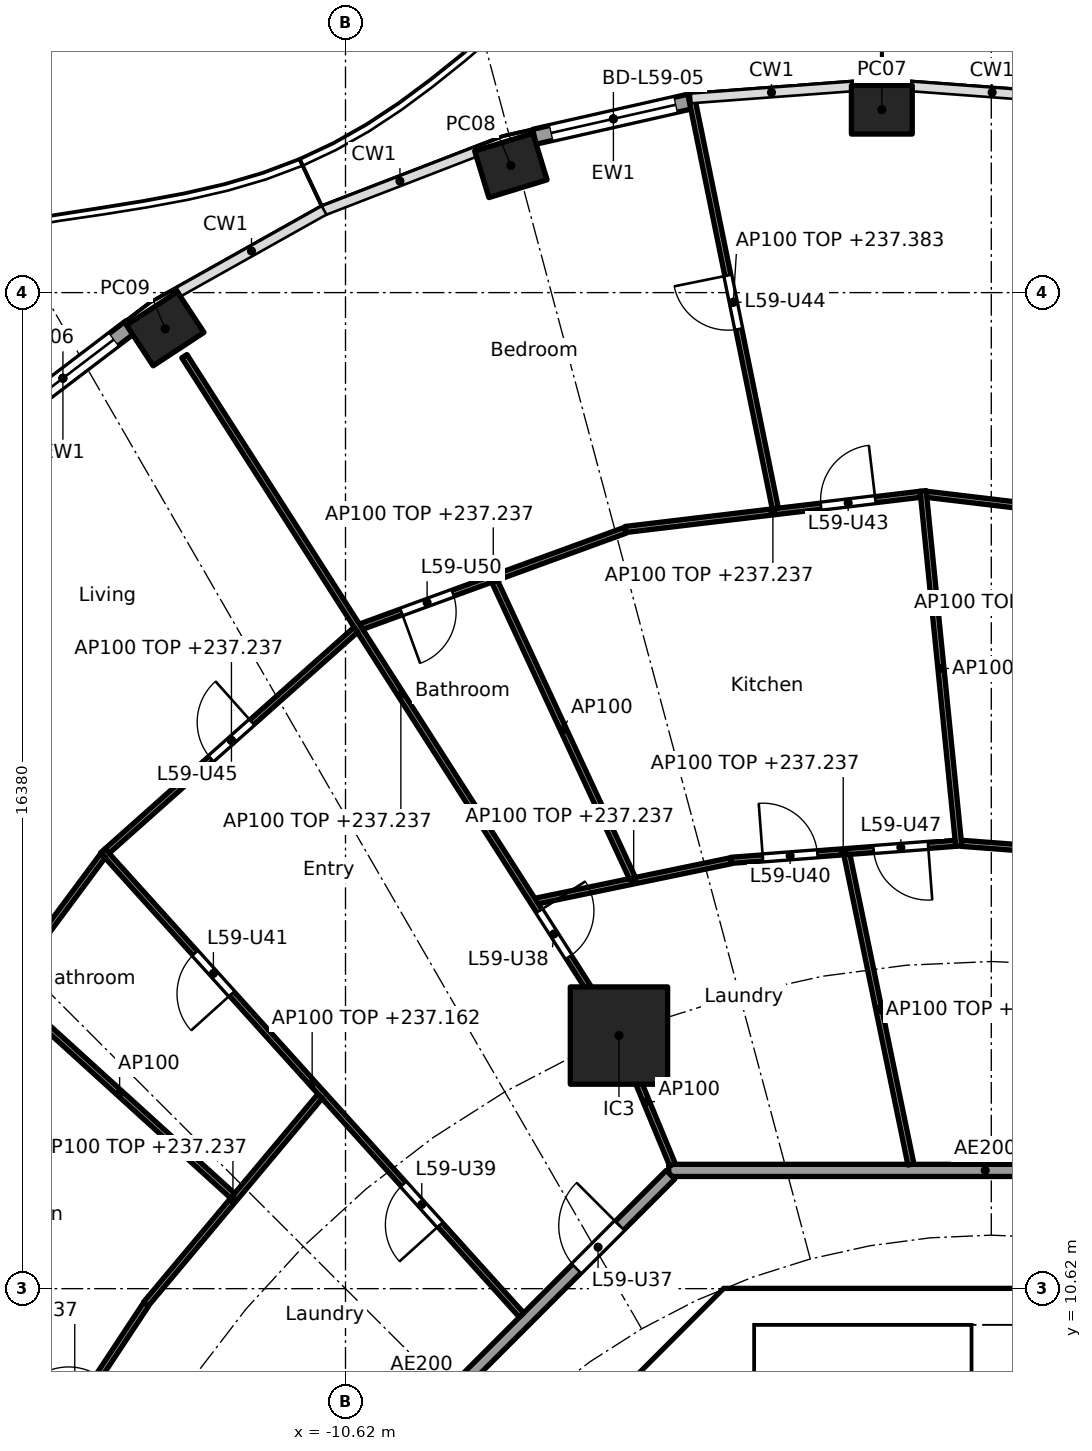
"""IFC4 building model, lengths in metres.
Left out: names, types, materials, properties, quantities, classifications, styles, units other than length and angle.
Written with IfcOpenShell. Run it as: python <this file> out.ifc"""

import sys

from ifc_helpers import new_model, si_unit, direction, frame, frame_2d, origin, origin_2d, place, context, subcontext, project, spatial, polyline, rectangle, hollow_rectangle, outline, extrude, element, fill, save


model = new_model("IFC4")
c1 = context("Model", 3, precision=1e-05, world=origin(), true_north=direction((0.0, 1.0)))
c2 = subcontext(c1, "Body", "Model", "MODEL_VIEW")
j1 = project(units=[si_unit("LENGTHUNIT", "METRE"), si_unit("PLANEANGLEUNIT", "RADIAN")], contexts=[c1])
p1 = place(None, origin())
s1 = spatial("IfcSite", under=j1, at=p1, CompositionType="ELEMENT")
p2 = place(p1, origin())
s2 = spatial("IfcBuilding", under=s1, at=p2, CompositionType="ELEMENT")
p3 = place(p2, frame((0.0, 0.0, 234.4)))
s3 = spatial("IfcBuildingStorey", under=s2, at=p3, CompositionType="ELEMENT", Elevation=234.4)
for number, where, z_axis, x_axis in (
    (1, (-1.8, 30.008, 0.0), (0.0, 0.0, 1.0), (-1.0, 0.0, 0.0)),
    (2, (-7.9, 29.092, 0.0), (0.0, 0.0, 1.0), (-0.957, -0.292, 0.0)),
    (3, (-13.585, 26.405, 0.0), (0.0, 0.0, 1.0), (-0.836, -0.549, 0.0)),
):
    element("IfcColumn", number, at=place(p3, frame(where, z_axis=z_axis, x_axis=x_axis)), inside=s3, PredefinedType="COLUMN", context=c2, shape_type="SweptSolid", body=[
        extrude(hollow_rectangle(XDim=1.0, YDim=0.8, WallThickness=0.032, at=origin_2d()), origin(), (0.0, 0.0, 1.0), 3.7),
    ])
p4 = place(p3, frame((-6.123, 14.782, 0.0), z_axis=(0.0, 0.0, 1.0), x_axis=(1.0, 0.0, 0.0)))
e4 = element("IfcColumn", 4, at=p4, inside=s3, PredefinedType="COLUMN", context=c2, shape_type="SweptSolid", body=[
    extrude(rectangle(XDim=1.6, YDim=1.6, at=origin_2d()), origin(), (0.0, 0.0, 1.0), 3.7),
])
p5 = place(p3, frame((-7.514, 29.563, 0.0), z_axis=(0.0, 0.0, 1.0), x_axis=(0.975324089124, 0.220777990694, 0.0)))
e5 = element("IfcWall", 5, at=p5, inside=s3, PredefinedType="SOLIDWALL", context=c2, shape_type="SweptSolid", body=[
    extrude(rectangle(XDim=2.666, YDim=0.25, at=frame_2d((1.333, 0.0))), origin(), (0.0, 0.0, 1.0), 3.44),
])
p6 = place(p5, frame((0.283, 0.0, 0.0)))
e6 = element("IfcOpeningElement", 6, at=p6, cuts=e5, PredefinedType="OPENING", context=c2, shape_type="SweptSolid", body=[
    extrude(rectangle(XDim=2.1, YDim=2.4, at=frame_2d((1.05, 1.2))), frame((0.0, 0.135, 0.0), z_axis=(0.0, -1.0, 0.0), x_axis=(1.0, 0.0, 0.0)), (0.0, 0.0, 1.0), 0.27),
])
p7 = place(p3, frame((-16.377, 24.748, 0.0), z_axis=(0.0, 0.0, 1.0), x_axis=(0.795990084031, 0.60530966135, 0.0)))
e7 = element("IfcWall", 7, at=p7, inside=s3, PredefinedType="SOLIDWALL", context=c2, shape_type="SweptSolid", body=[
    extrude(rectangle(XDim=2.789, YDim=0.25, at=frame_2d((1.394, 0.0))), origin(), (0.0, 0.0, 1.0), 3.44),
])
p8 = place(p7, frame((0.344, 0.0, 0.0)))
e8 = element("IfcOpeningElement", 8, at=p8, cuts=e7, PredefinedType="OPENING", context=c2, shape_type="SweptSolid", body=[
    extrude(rectangle(XDim=2.1, YDim=2.4, at=frame_2d((1.05, 1.2))), frame((0.0, 0.135, 0.0), z_axis=(0.0, -1.0, 0.0), x_axis=(1.0, 0.0, 0.0)), (0.0, 0.0, 1.0), 0.27),
])
p9 = place(p3, frame((-4.613, 9.988, 0.0), z_axis=(0.0, 0.0, 1.0), x_axis=(-0.707106781187, -0.707106781187, 0.0)))
e9 = element("IfcWall", 9, at=p9, inside=s3, PredefinedType="SHEAR", context=c2, shape_type="SweptSolid", body=[
    extrude(rectangle(XDim=7.602, YDim=0.6, at=frame_2d((3.801, 0.0))), origin(), (0.0, 0.0, 1.0), 3.44),
])
p10 = place(p9, frame((0.351, 0.0, 0.0)))
e10 = element("IfcOpeningElement", 10, at=p10, cuts=e9, PredefinedType="OPENING", context=c2, shape_type="SweptSolid", body=[
    extrude(rectangle(XDim=1.1, YDim=2.1, at=frame_2d((0.55, 1.05))), frame((0.0, 0.31, 0.0), z_axis=(0.0, -1.0, 0.0), x_axis=(1.0, 0.0, 0.0)), (0.0, 0.0, 1.0), 0.62),
])
p11 = place(p3, origin())
e11 = element("IfcWall", 11, at=p11, inside=s3, PredefinedType="SHEAR", context=c2, shape_type="SweptSolid", body=[
    extrude(outline(polyline([(-4.152, 10.025), (-4.401, 9.776), (-4.825, 10.2), (-4.401, 10.625), (4.401, 10.625), (4.825, 10.2), (4.401, 9.776), (4.152, 10.025), (-4.152, 10.025)])), origin(), (0.0, 0.0, 1.0), 3.44),
])
p12 = place(p3, origin())
e12 = element("IfcWall", 12, at=p12, inside=s3, PredefinedType="SOLIDWALL", context=c2, shape_type="SweptSolid", body=[
    extrude(outline(polyline([(-3.9, 7.025), (-4.1, 7.025), (-4.1, 10.025), (-3.9, 10.025), (-3.9, 7.025)])), origin(), (0.0, 0.0, 1.0), 3.44),
])
p13 = place(p3, frame((-14.829, 6.141, 0.0), z_axis=(0.0, 0.0, 1.0), x_axis=(-0.929202069098, 0.36957206981, 0.0)))
e13 = element("IfcWall", 13, at=p13, inside=s3, PredefinedType="PARTITIONING", context=c2, shape_type="SweptSolid", body=[
    extrude(rectangle(XDim=9.957, YDim=0.2, at=frame_2d((4.978, 0.0))), origin(), (0.0, 0.0, 1.0), 2.837),
])
p14 = place(p3, frame((5.104, 12.565, 0.0), z_axis=(0.0, 0.0, 1.0), x_axis=(-1.0, 0.0, 0.0)))
e14 = element("IfcWall", 14, at=p14, inside=s3, PredefinedType="PARTITIONING", context=c2, shape_type="SweptSolid", body=[
    extrude(rectangle(XDim=10.409, YDim=0.2, at=frame_2d((5.205, 0.0))), origin(), (0.0, 0.0, 1.0), 3.44),
])
p15 = place(p3, frame((-5.275, 12.494, 0.0), z_axis=(0.0, 0.0, 1.0), x_axis=(-0.707106781187, -0.707106781187, 0.0)))
e15 = element("IfcWall", 15, at=p15, inside=s3, PredefinedType="PARTITIONING", context=c2, shape_type="SweptSolid", body=[
    extrude(rectangle(XDim=10.209, YDim=0.2, at=frame_2d((5.104, 0.0))), origin(), (0.0, 0.0, 1.0), 3.44),
])
p16 = place(p15, frame((1.185, 0.0, 0.0)))
e16 = element("IfcOpeningElement", 16, at=p16, cuts=e15, PredefinedType="OPENING", context=c2, shape_type="SweptSolid", body=[
    extrude(rectangle(XDim=1.0, YDim=2.1, at=frame_2d((0.5, 1.05))), frame((0.0, 0.11, 0.0), z_axis=(0.0, -1.0, 0.0), x_axis=(1.0, 0.0, 0.0)), (0.0, 0.0, 1.0), 0.22),
])
p17 = place(p3, frame((3.101, 17.671, 0.0), z_axis=(0.0, 0.0, 1.0), x_axis=(-0.997133705575, 0.075659587668, 0.0)))
e17 = element("IfcWall", 17, at=p17, inside=s3, PredefinedType="PARTITIONING", context=c2, shape_type="SweptSolid", body=[
    extrude(rectangle(XDim=3.601, YDim=0.1, at=frame_2d((1.801, 0.0))), origin(), (0.0, 0.0, 1.0), 2.837),
])
p18 = place(p3, frame((3.686, 23.117, 0.0), z_axis=(0.0, 0.0, 1.0), x_axis=(-0.992965872314, 0.11840091393, 0.0)))
e18 = element("IfcWall", 18, at=p18, inside=s3, PredefinedType="PARTITIONING", context=c2, shape_type="SweptSolid", body=[
    extrude(rectangle(XDim=4.786, YDim=0.1, at=frame_2d((2.393, 0.0))), origin(), (0.0, 0.0, 1.0), 2.837),
])
p19 = place(p18, frame((1.943, 0.0, 0.0)))
e19 = element("IfcOpeningElement", 19, at=p19, cuts=e18, PredefinedType="OPENING", context=c2, shape_type="SweptSolid", body=[
    extrude(rectangle(XDim=0.9, YDim=2.1, at=frame_2d((0.45, 1.05))), frame((0.0, 0.06, 0.0), z_axis=(0.0, -1.0, 0.0), x_axis=(1.0, 0.0, 0.0)), (0.0, 0.0, 1.0), 0.12),
])
p20 = place(p3, frame((-0.535, 17.898, 0.0), z_axis=(0.0, 0.0, 1.0), x_axis=(-0.099853714131, 0.995002128527, 0.0)))
e20 = element("IfcWall", 20, at=p20, inside=s3, PredefinedType="PARTITIONING", context=c2, shape_type="SweptSolid", body=[
    extrude(rectangle(XDim=5.87, YDim=0.1, at=frame_2d((2.935, 0.0))), origin(), (0.0, 0.0, 1.0), 3.44),
])
p21 = place(p3, frame((-0.59, 17.944, 0.0), z_axis=(0.0, 0.0, 1.0), x_axis=(-0.997133495787, -0.075662352452, 0.0)))
e21 = element("IfcWall", 21, at=p21, inside=s3, PredefinedType="PARTITIONING", context=c2, shape_type="SweptSolid", body=[
    extrude(rectangle(XDim=3.701, YDim=0.1, at=frame_2d((1.851, 0.0))), origin(), (0.0, 0.0, 1.0), 2.837),
])
p22 = place(p21, frame((2.276, 0.0, 0.0)))
e22 = element("IfcOpeningElement", 22, at=p22, cuts=e21, PredefinedType="OPENING", context=c2, shape_type="SweptSolid", body=[
    extrude(rectangle(XDim=0.9, YDim=2.1, at=frame_2d((0.45, 1.05))), frame((0.0, 0.06, 0.0), z_axis=(0.0, -1.0, 0.0), x_axis=(1.0, 0.0, 0.0)), (0.0, 0.0, 1.0), 0.12),
])
p23 = place(p21, frame((0.45, 0.0, 0.0)))
e23 = element("IfcOpeningElement", 23, at=p23, cuts=e21, PredefinedType="OPENING", context=c2, shape_type="SweptSolid", body=[
    extrude(rectangle(XDim=0.9, YDim=2.1, at=frame_2d((0.45, 1.05))), frame((0.0, 0.06, 0.0), z_axis=(0.0, -1.0, 0.0), x_axis=(1.0, 0.0, 0.0)), (0.0, 0.0, 1.0), 0.12),
])
p24 = place(p3, frame((-1.166, 23.683, 0.0), z_axis=(0.0, 0.0, 1.0), x_axis=(-0.992961712415, -0.118435795593, 0.0)))
e24 = element("IfcWall", 24, at=p24, inside=s3, PredefinedType="PARTITIONING", context=c2, shape_type="SweptSolid", body=[
    extrude(rectangle(XDim=4.885, YDim=0.1, at=frame_2d((2.443, 0.0))), origin(), (0.0, 0.0, 1.0), 2.837),
])
p25 = place(p24, frame((0.746, 0.0, 0.0)))
e25 = element("IfcOpeningElement", 25, at=p25, cuts=e24, PredefinedType="OPENING", context=c2, shape_type="SweptSolid", body=[
    extrude(rectangle(XDim=0.9, YDim=2.1, at=frame_2d((0.45, 1.05))), frame((0.0, 0.06, 0.0), z_axis=(0.0, -1.0, 0.0), x_axis=(1.0, 0.0, 0.0)), (0.0, 0.0, 1.0), 0.12),
])
p26 = place(p3, frame((-1.321, 12.663, 0.0), z_axis=(0.0, 0.0, 1.0), x_axis=(-0.202526486639, 0.979276785291, 0.0)))
e26 = element("IfcWall", 26, at=p26, inside=s3, PredefinedType="PARTITIONING", context=c2, shape_type="SweptSolid", body=[
    extrude(rectangle(XDim=5.204, YDim=0.1, at=frame_2d((2.602, 0.0))), origin(), (0.0, 0.0, 1.0), 2.762),
])
p27 = place(p3, frame((-3.552, 23.449, 0.0), z_axis=(0.0, 0.0, 1.0), x_axis=(-0.199593197846, 0.979878847294, 0.0)))
e27 = element("IfcWall", 27, at=p27, inside=s3, PredefinedType="PARTITIONING", context=c2, shape_type="SweptSolid", body=[
    extrude(rectangle(XDim=6.925, YDim=0.1, at=frame_2d((3.462, 0.0))), origin(), (0.0, 0.0, 1.0), 2.983),
])
p28 = place(p27, frame((3.012, 0.0, 0.0)))
e28 = element("IfcOpeningElement", 28, at=p28, cuts=e27, PredefinedType="OPENING", context=c2, shape_type="SweptSolid", body=[
    extrude(rectangle(XDim=0.9, YDim=2.1, at=frame_2d((0.45, 1.05))), frame((0.0, 0.06, 0.0), z_axis=(0.0, -1.0, 0.0), x_axis=(1.0, 0.0, 0.0)), (0.0, 0.0, 1.0), 0.12),
])
p29 = place(p3, frame((-4.28, 17.657, 0.0), z_axis=(0.0, 0.0, 1.0), x_axis=(-0.979205232861, -0.202872156637, 0.0)))
e29 = element("IfcWall", 29, at=p29, inside=s3, PredefinedType="PARTITIONING", context=c2, shape_type="SweptSolid", body=[
    extrude(rectangle(XDim=3.271, YDim=0.1, at=frame_2d((1.635, 0.0))), origin(), (0.0, 0.0, 1.0), 2.837),
])
p30 = place(p3, frame((-6.014, 23.094, 0.0), z_axis=(0.0, 0.0, 1.0), x_axis=(-0.939417400947, -0.342775359089, 0.0)))
e30 = element("IfcWall", 30, at=p30, inside=s3, PredefinedType="PARTITIONING", context=c2, shape_type="SweptSolid", body=[
    extrude(rectangle(XDim=4.633, YDim=0.1, at=frame_2d((2.316, 0.0))), origin(), (0.0, 0.0, 1.0), 2.837),
])
p31 = place(p30, frame((3.024, 0.0, 0.0)))
e31 = element("IfcOpeningElement", 31, at=p31, cuts=e30, PredefinedType="OPENING", context=c2, shape_type="SweptSolid", body=[
    extrude(rectangle(XDim=0.9, YDim=2.1, at=frame_2d((0.45, 1.05))), frame((0.0, 0.06, 0.0), z_axis=(0.0, -1.0, 0.0), x_axis=(1.0, 0.0, 0.0)), (0.0, 0.0, 1.0), 0.12),
])
p32 = place(p3, frame((-5.902, 17.371, 0.0), z_axis=(0.0, 0.0, 1.0), x_axis=(-0.421124629357, 0.907002781996, 0.0)))
e32 = element("IfcWall", 32, at=p32, inside=s3, PredefinedType="PARTITIONING", context=c2, shape_type="SweptSolid", body=[
    extrude(rectangle(XDim=5.384, YDim=0.1, at=frame_2d((2.692, 0.0))), origin(), (0.0, 0.0, 1.0), 3.44),
])
p33 = place(p3, frame((-5.243, 12.657, 0.0), z_axis=(0.0, 0.0, 1.0), x_axis=(-0.382757529444, 0.923848837015, 0.0)))
e33 = element("IfcWall", 33, at=p33, inside=s3, PredefinedType="PARTITIONING", context=c2, shape_type="SweptSolid", body=[
    extrude(rectangle(XDim=2.25, YDim=0.1, at=frame_2d((1.125, 0.0))), origin(), (0.0, 0.0, 1.0), 3.44),
])
p34 = place(p3, frame((-6.15, 14.824, 0.0), z_axis=(0.0, 0.0, 1.0), x_axis=(-0.538870687577, 0.842388498301, 0.0)))
e34 = element("IfcWall", 34, at=p34, inside=s3, PredefinedType="PARTITIONING", context=c2, shape_type="SweptSolid", body=[
    extrude(rectangle(XDim=13.213, YDim=0.1, at=frame_2d((6.606, 0.0))), origin(), (0.0, 0.0, 1.0), 2.837),
])
p35 = place(p34, frame((1.483, 0.0, 0.0)))
e35 = element("IfcOpeningElement", 35, at=p35, cuts=e34, PredefinedType="OPENING", context=c2, shape_type="SweptSolid", body=[
    extrude(rectangle(XDim=0.9, YDim=2.1, at=frame_2d((0.45, 1.05))), frame((0.0, 0.06, 0.0), z_axis=(0.0, -1.0, 0.0), x_axis=(1.0, 0.0, 0.0)), (0.0, 0.0, 1.0), 0.12),
])
p36 = place(p3, frame((-10.45, 21.455, 0.0), z_axis=(0.0, 0.0, 1.0), x_axis=(-0.747150931973, -0.66465441009, 0.0)))
e36 = element("IfcWall", 36, at=p36, inside=s3, PredefinedType="PARTITIONING", context=c2, shape_type="SweptSolid", body=[
    extrude(rectangle(XDim=5.475, YDim=0.1, at=frame_2d((2.737, 0.0))), origin(), (0.0, 0.0, 1.0), 2.837),
])
p37 = place(p36, frame((2.288, 0.0, 0.0)))
e37 = element("IfcOpeningElement", 37, at=p37, cuts=e36, PredefinedType="OPENING", context=c2, shape_type="SweptSolid", body=[
    extrude(rectangle(XDim=0.9, YDim=2.1, at=frame_2d((0.45, 1.05))), frame((0.0, 0.06, 0.0), z_axis=(0.0, -1.0, 0.0), x_axis=(1.0, 0.0, 0.0)), (0.0, 0.0, 1.0), 0.12),
])
p38 = place(p3, frame((-7.725, 10.186, 0.0), z_axis=(0.0, 0.0, 1.0), x_axis=(-0.669819599194, 0.742523874725, 0.0)))
e38 = element("IfcWall", 38, at=p38, inside=s3, PredefinedType="PARTITIONING", context=c2, shape_type="SweptSolid", body=[
    extrude(rectangle(XDim=10.282, YDim=0.1, at=frame_2d((5.141, 0.0))), origin(), (0.0, 0.0, 1.0), 2.762),
])
p39 = place(p38, frame((2.0, 0.0, 0.0)))
e39 = element("IfcOpeningElement", 39, at=p39, cuts=e38, PredefinedType="OPENING", context=c2, shape_type="SweptSolid", body=[
    extrude(rectangle(XDim=0.9, YDim=2.1, at=frame_2d((0.45, 1.05))), frame((0.0, 0.06, 0.0), z_axis=(0.0, -1.0, 0.0), x_axis=(1.0, 0.0, 0.0)), (0.0, 0.0, 1.0), 0.12),
])
p40 = place(p38, frame((7.116, 0.0, 0.0)))
e40 = element("IfcOpeningElement", 40, at=p40, cuts=e38, PredefinedType="OPENING", context=c2, shape_type="SweptSolid", body=[
    extrude(rectangle(XDim=0.9, YDim=2.1, at=frame_2d((0.45, 1.05))), frame((0.0, 0.06, 0.0), z_axis=(0.0, -1.0, 0.0), x_axis=(1.0, 0.0, 0.0)), (0.0, 0.0, 1.0), 0.12),
])
p41 = place(p3, frame((-11.039, 13.785, 0.0), z_axis=(0.0, 0.0, 1.0), x_axis=(-0.642254625966, -0.766491353784, 0.0)))
e41 = element("IfcWall", 41, at=p41, inside=s3, PredefinedType="PARTITIONING", context=c2, shape_type="SweptSolid", body=[
    extrude(rectangle(XDim=4.461, YDim=0.1, at=frame_2d((2.23, 0.0))), origin(), (0.0, 0.0, 1.0), 2.837),
])
p42 = place(p3, frame((-14.608, 17.743, 0.0), z_axis=(0.0, 0.0, 1.0), x_axis=(-0.596174489482, -0.8028548923, 0.0)))
e42 = element("IfcWall", 42, at=p42, inside=s3, PredefinedType="PARTITIONING", context=c2, shape_type="SweptSolid", body=[
    extrude(rectangle(XDim=5.442, YDim=0.1, at=frame_2d((2.721, 0.0))), origin(), (0.0, 0.0, 1.0), 2.837),
])
p43 = place(p3, frame((-12.476, 12.147, 0.0), z_axis=(0.0, 0.0, 1.0), x_axis=(-0.740129203525, 0.672464692077, 0.0)))
e43 = element("IfcWall", 43, at=p43, inside=s3, PredefinedType="PARTITIONING", context=c2, shape_type="SweptSolid", body=[
    extrude(rectangle(XDim=5.022, YDim=0.1, at=frame_2d((2.511, 0.0))), origin(), (0.0, 0.0, 1.0), 3.44),
])
p44 = place(p3, frame((-13.899, 10.363, 0.0), z_axis=(0.0, 0.0, 1.0), x_axis=(-0.551267958114, -0.834328255758, 0.0)))
e44 = element("IfcWall", 44, at=p44, inside=s3, PredefinedType="PARTITIONING", context=c2, shape_type="SweptSolid", body=[
    extrude(rectangle(XDim=4.257, YDim=0.1, at=frame_2d((2.129, 0.0))), origin(), (0.0, 0.0, 1.0), 2.837),
])
p45 = place(p44, frame((1.413, 0.0, 0.0)))
e45 = element("IfcOpeningElement", 45, at=p45, cuts=e44, PredefinedType="OPENING", context=c2, shape_type="SweptSolid", body=[
    extrude(rectangle(XDim=0.9, YDim=2.1, at=frame_2d((0.45, 1.05))), frame((0.0, 0.06, 0.0), z_axis=(0.0, -1.0, 0.0), x_axis=(1.0, 0.0, 0.0)), (0.0, 0.0, 1.0), 0.12),
])
p46 = place(p6, origin())
e46 = element("IfcDoor", 46, at=p46, inside=s3, OperationType="SLIDING_TO_LEFT", PredefinedType="DOOR", context=c2, shape_type="SweptSolid", body=[
    extrude(rectangle(XDim=2.1, YDim=2.4, at=frame_2d((1.05, 1.2))), frame((0.0, 0.025, 0.0), z_axis=(0.0, -1.0, 0.0), x_axis=(1.0, 0.0, 0.0)), (0.0, 0.0, 1.0), 0.05),
])
fill(e6, e46)
p47 = place(p8, origin())
e47 = element("IfcDoor", 47, at=p47, inside=s3, OperationType="SLIDING_TO_LEFT", PredefinedType="DOOR", context=c2, shape_type="SweptSolid", body=[
    extrude(rectangle(XDim=2.1, YDim=2.4, at=frame_2d((1.05, 1.2))), frame((0.0, 0.025, 0.0), z_axis=(0.0, -1.0, 0.0), x_axis=(1.0, 0.0, 0.0)), (0.0, 0.0, 1.0), 0.05),
])
fill(e8, e47)
p48 = place(p10, origin())
e48 = element("IfcDoor", 48, at=p48, inside=s3, OperationType="SINGLE_SWING_LEFT", PredefinedType="DOOR", context=c2, shape_type="SweptSolid", body=[
    extrude(rectangle(XDim=1.1, YDim=2.1, at=frame_2d((0.55, 1.05))), frame((0.0, 0.025, 0.0), z_axis=(0.0, -1.0, 0.0), x_axis=(1.0, 0.0, 0.0)), (0.0, 0.0, 1.0), 0.05),
])
fill(e10, e48)
p49 = place(p16, frame((1.0, 0.0, 0.0), x_axis=(-1.0, 0.0, 0.0)))
e49 = element("IfcDoor", 49, at=p49, inside=s3, OperationType="SINGLE_SWING_RIGHT", PredefinedType="DOOR", context=c2, shape_type="SweptSolid", body=[
    extrude(rectangle(XDim=1.0, YDim=2.1, at=frame_2d((0.5, 1.05))), frame((0.0, 0.025, 0.0), z_axis=(0.0, -1.0, 0.0), x_axis=(1.0, 0.0, 0.0)), (0.0, 0.0, 1.0), 0.05),
])
fill(e16, e49)
p50 = place(p35, frame((0.9, 0.0, 0.0), x_axis=(-1.0, 0.0, 0.0)))
e50 = element("IfcDoor", 50, at=p50, inside=s3, OperationType="SINGLE_SWING_LEFT", PredefinedType="DOOR", context=c2, shape_type="SweptSolid", body=[
    extrude(rectangle(XDim=0.9, YDim=2.1, at=frame_2d((0.45, 1.05))), frame((0.0, 0.025, 0.0), z_axis=(0.0, -1.0, 0.0), x_axis=(1.0, 0.0, 0.0)), (0.0, 0.0, 1.0), 0.05),
])
fill(e35, e50)
p51 = place(p39, origin())
e51 = element("IfcDoor", 51, at=p51, inside=s3, OperationType="SINGLE_SWING_LEFT", PredefinedType="DOOR", context=c2, shape_type="SweptSolid", body=[
    extrude(rectangle(XDim=0.9, YDim=2.1, at=frame_2d((0.45, 1.05))), frame((0.0, 0.025, 0.0), z_axis=(0.0, -1.0, 0.0), x_axis=(1.0, 0.0, 0.0)), (0.0, 0.0, 1.0), 0.05),
])
fill(e39, e51)
p52 = place(p22, frame((0.9, 0.0, 0.0), x_axis=(-1.0, 0.0, 0.0)))
e52 = element("IfcDoor", 52, at=p52, inside=s3, OperationType="SINGLE_SWING_LEFT", PredefinedType="DOOR", context=c2, shape_type="SweptSolid", body=[
    extrude(rectangle(XDim=0.9, YDim=2.1, at=frame_2d((0.45, 1.05))), frame((0.0, 0.025, 0.0), z_axis=(0.0, -1.0, 0.0), x_axis=(1.0, 0.0, 0.0)), (0.0, 0.0, 1.0), 0.05),
])
fill(e22, e52)
p53 = place(p40, origin())
e53 = element("IfcDoor", 53, at=p53, inside=s3, OperationType="SINGLE_SWING_LEFT", PredefinedType="DOOR", context=c2, shape_type="SweptSolid", body=[
    extrude(rectangle(XDim=0.9, YDim=2.1, at=frame_2d((0.45, 1.05))), frame((0.0, 0.025, 0.0), z_axis=(0.0, -1.0, 0.0), x_axis=(1.0, 0.0, 0.0)), (0.0, 0.0, 1.0), 0.05),
])
fill(e40, e53)
p54 = place(p25, frame((0.9, 0.0, 0.0), x_axis=(-1.0, 0.0, 0.0)))
e54 = element("IfcDoor", 54, at=p54, inside=s3, OperationType="SINGLE_SWING_RIGHT", PredefinedType="DOOR", context=c2, shape_type="SweptSolid", body=[
    extrude(rectangle(XDim=0.9, YDim=2.1, at=frame_2d((0.45, 1.05))), frame((0.0, 0.025, 0.0), z_axis=(0.0, -1.0, 0.0), x_axis=(1.0, 0.0, 0.0)), (0.0, 0.0, 1.0), 0.05),
])
fill(e25, e54)
p55 = place(p28, origin())
e55 = element("IfcDoor", 55, at=p55, inside=s3, OperationType="SINGLE_SWING_RIGHT", PredefinedType="DOOR", context=c2, shape_type="SweptSolid", body=[
    extrude(rectangle(XDim=0.9, YDim=2.1, at=frame_2d((0.45, 1.05))), frame((0.0, 0.025, 0.0), z_axis=(0.0, -1.0, 0.0), x_axis=(1.0, 0.0, 0.0)), (0.0, 0.0, 1.0), 0.05),
])
fill(e28, e55)
p56 = place(p37, frame((0.9, 0.0, 0.0), x_axis=(-1.0, 0.0, 0.0)))
e56 = element("IfcDoor", 56, at=p56, inside=s3, OperationType="SINGLE_SWING_RIGHT", PredefinedType="DOOR", context=c2, shape_type="SweptSolid", body=[
    extrude(rectangle(XDim=0.9, YDim=2.1, at=frame_2d((0.45, 1.05))), frame((0.0, 0.025, 0.0), z_axis=(0.0, -1.0, 0.0), x_axis=(1.0, 0.0, 0.0)), (0.0, 0.0, 1.0), 0.05),
])
fill(e37, e56)
p57 = place(p23, origin())
e57 = element("IfcDoor", 57, at=p57, inside=s3, OperationType="SINGLE_SWING_LEFT", PredefinedType="DOOR", context=c2, shape_type="SweptSolid", body=[
    extrude(rectangle(XDim=0.9, YDim=2.1, at=frame_2d((0.45, 1.05))), frame((0.0, 0.025, 0.0), z_axis=(0.0, -1.0, 0.0), x_axis=(1.0, 0.0, 0.0)), (0.0, 0.0, 1.0), 0.05),
])
fill(e23, e57)
p58 = place(p31, origin())
e58 = element("IfcDoor", 58, at=p58, inside=s3, OperationType="SINGLE_SWING_RIGHT", PredefinedType="DOOR", context=c2, shape_type="SweptSolid", body=[
    extrude(rectangle(XDim=0.9, YDim=2.1, at=frame_2d((0.45, 1.05))), frame((0.0, 0.025, 0.0), z_axis=(0.0, -1.0, 0.0), x_axis=(1.0, 0.0, 0.0)), (0.0, 0.0, 1.0), 0.05),
])
fill(e31, e58)
save(model, sys.argv[1])
